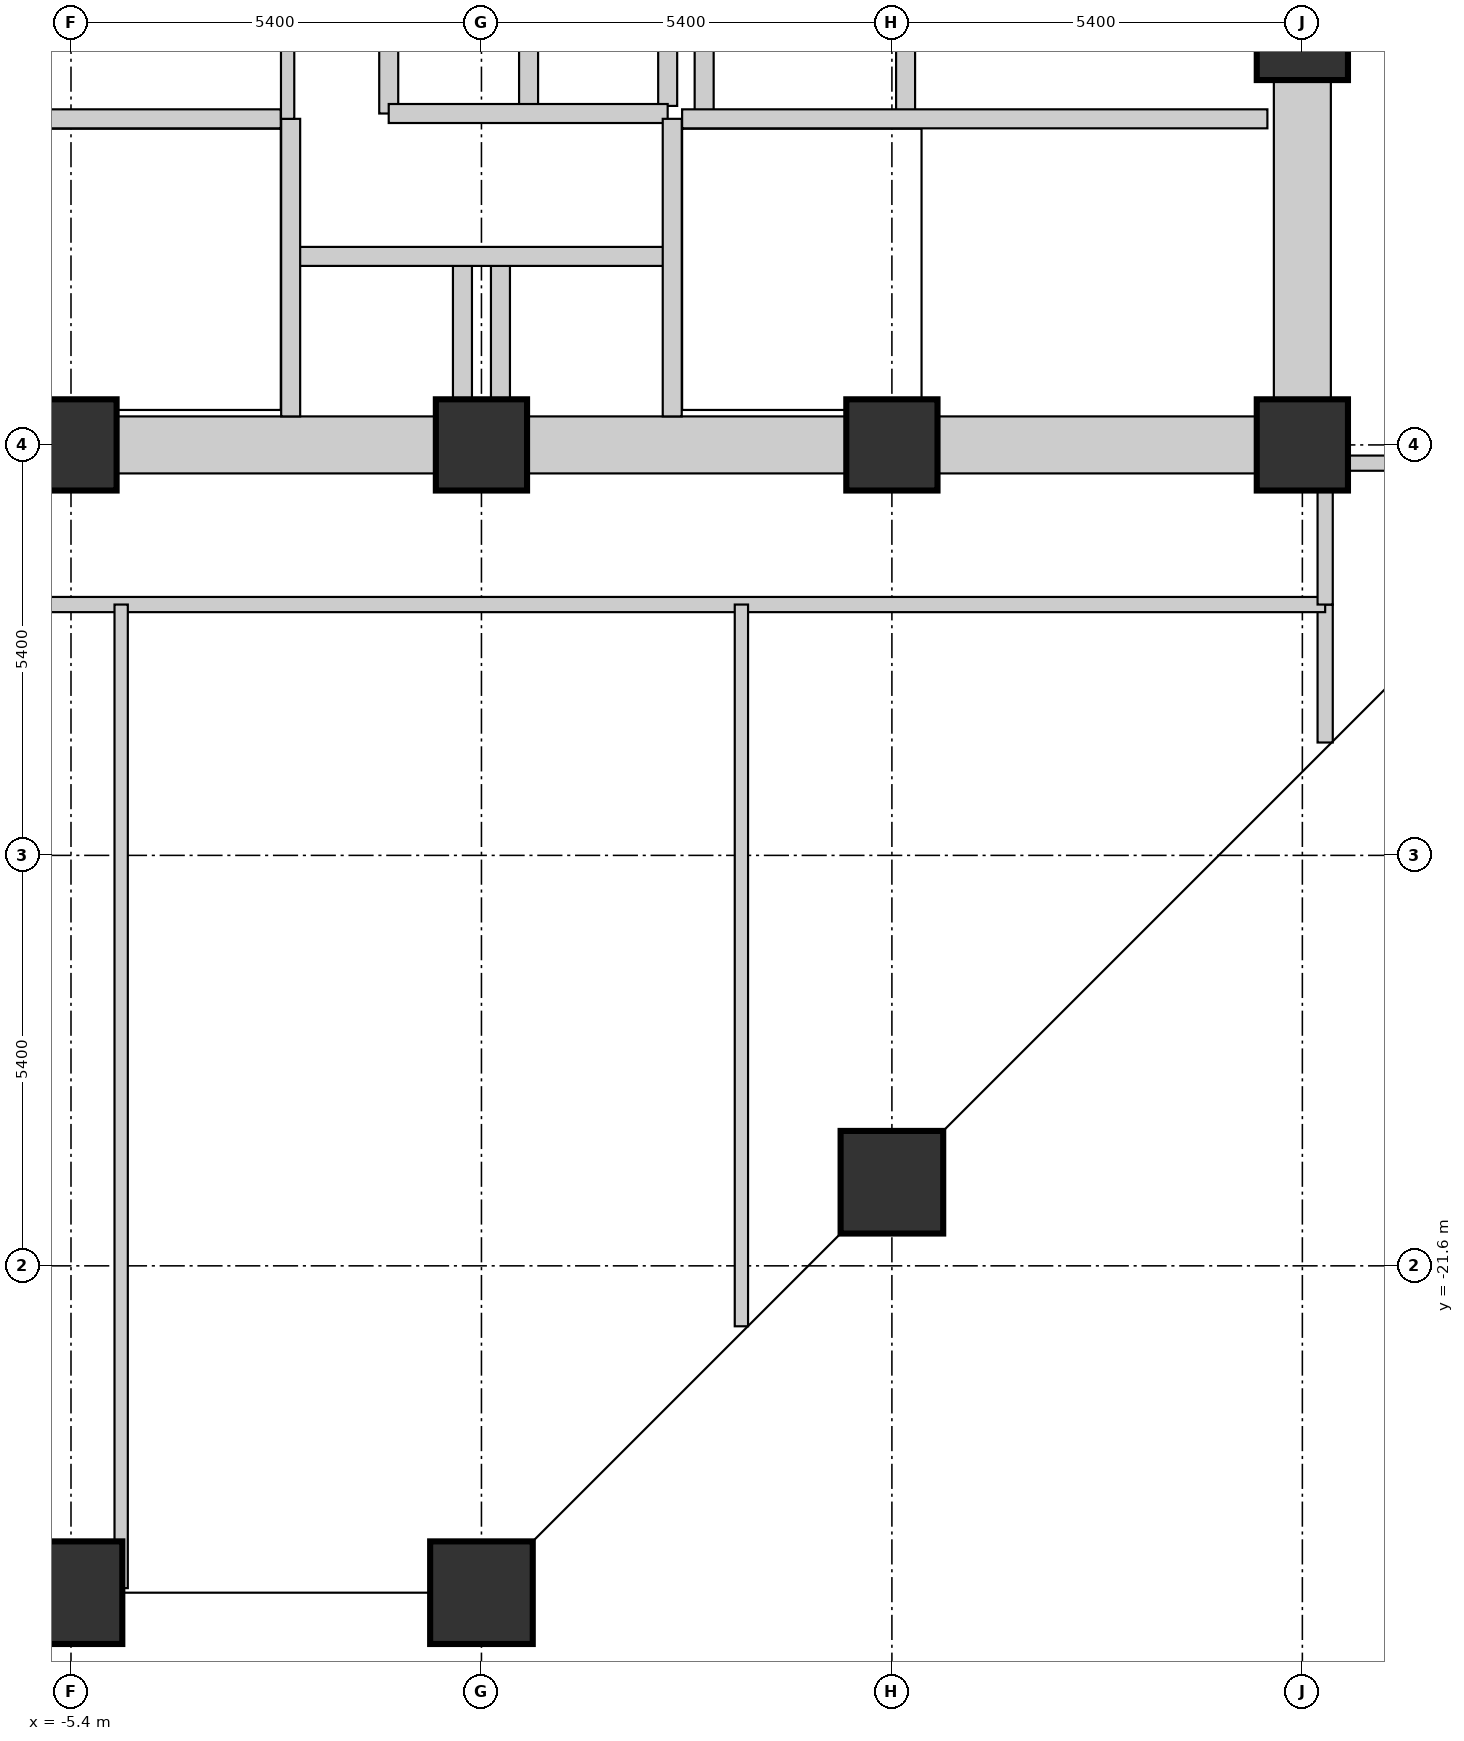
"""IFC4 building model, lengths in metres.
Left out: names, types, materials, properties, quantities, classifications, styles, units other than length and angle.
Written with IfcOpenShell. Run it as: python <this file> out.ifc"""

import sys

from ifc_helpers import new_model, si_unit, direction, frame, frame_2d, origin, origin_2d, place, context, subcontext, project, spatial, rectangle, extrude, element, fill, save


model = new_model("IFC4")
c1 = context("Model", 3, precision=1e-05, world=origin(), true_north=direction((0.0, 1.0)))
c2 = subcontext(c1, "Body", "Model", "MODEL_VIEW")
j1 = project(units=[si_unit("LENGTHUNIT", "METRE"), si_unit("PLANEANGLEUNIT", "RADIAN")], contexts=[c1])
p1 = place(None, origin())
s1 = spatial("IfcSite", under=j1, at=p1, CompositionType="ELEMENT")
p2 = place(p1, origin())
s2 = spatial("IfcBuilding", under=s1, at=p2, CompositionType="ELEMENT")
p3 = place(p2, frame((0.0, 0.0, 22.5)))
s3 = spatial("IfcBuildingStorey", under=s2, at=p3, CompositionType="ELEMENT", Elevation=22.5)
p4 = place(p3, frame((-5.4, -25.9, 0.0), z_axis=(0.0, 0.0, 1.0), x_axis=(1.0, 0.0, 0.0)))
e1 = element("IfcColumn", 1, at=p4, inside=s3, PredefinedType="COLUMN", context=c2, shape_type="SweptSolid", body=[
    extrude(rectangle(XDim=1.35, YDim=1.35, at=origin_2d()), origin(), (0.0, 0.0, 1.0), 3.75),
])
p5 = place(p3, frame((-5.4, -10.8, 0.0), z_axis=(0.0, 0.0, 1.0), x_axis=(1.0, 0.0, 0.0)))
e2 = element("IfcColumn", 2, at=p5, inside=s3, PredefinedType="COLUMN", context=c2, shape_type="SweptSolid", body=[
    extrude(rectangle(XDim=1.2, YDim=1.2, at=origin_2d()), origin(), (0.0, 0.0, 1.0), 3.75),
])
p6 = place(p3, frame((0.0, -25.9, 0.0), z_axis=(0.0, 0.0, 1.0), x_axis=(1.0, 0.0, 0.0)))
e3 = element("IfcColumn", 3, at=p6, inside=s3, PredefinedType="COLUMN", context=c2, shape_type="SweptSolid", body=[
    extrude(rectangle(XDim=1.35, YDim=1.35, at=origin_2d()), origin(), (0.0, 0.0, 1.0), 3.75),
])
p7 = place(p3, frame((0.0, -10.8, 0.0), z_axis=(0.0, 0.0, 1.0), x_axis=(1.0, 0.0, 0.0)))
e4 = element("IfcColumn", 4, at=p7, inside=s3, PredefinedType="COLUMN", context=c2, shape_type="SweptSolid", body=[
    extrude(rectangle(XDim=1.2, YDim=1.2, at=origin_2d()), origin(), (0.0, 0.0, 1.0), 3.75),
])
p8 = place(p3, frame((5.4, -20.5, 0.0), z_axis=(0.0, 0.0, 1.0), x_axis=(1.0, 0.0, 0.0)))
e5 = element("IfcColumn", 5, at=p8, inside=s3, PredefinedType="COLUMN", context=c2, shape_type="SweptSolid", body=[
    extrude(rectangle(XDim=1.35, YDim=1.35, at=origin_2d()), origin(), (0.0, 0.0, 1.0), 3.75),
])
for number, where, z_axis, x_axis in (
    (6, (5.4, -10.8, 0.0), (0.0, 0.0, 1.0), (1.0, 0.0, 0.0)),
    (7, (10.8, -10.8, 0.0), (0.0, 0.0, 1.0), (1.0, 0.0, 0.0)),
    (8, (10.8, -5.4, 0.0), (0.0, 0.0, 1.0), (1.0, 0.0, 0.0)),
):
    element("IfcColumn", number, at=place(p3, frame(where, z_axis=z_axis, x_axis=x_axis)), inside=s3, PredefinedType="COLUMN", context=c2, shape_type="SweptSolid", body=[
        extrude(rectangle(XDim=1.2, YDim=1.2, at=origin_2d()), origin(), (0.0, 0.0, 1.0), 3.75),
    ])
for number, where, z_axis, x_axis in (
    (9, (10.8, -10.19, 0.0), (0.0, 0.0, 1.0), (0.0, 1.0, 0.0)),
    (10, (-4.79, -10.8, 0.0), (0.0, 0.0, 1.0), (1.0, 0.0, 0.0)),
    (11, (0.61, -10.8, 0.0), (0.0, 0.0, 1.0), (1.0, 0.0, 0.0)),
    (12, (6.01, -10.8, 0.0), (0.0, 0.0, 1.0), (1.0, 0.0, 0.0)),
):
    element("IfcWall", number, at=place(p3, frame(where, z_axis=z_axis, x_axis=x_axis)), inside=s3, PredefinedType="SHEAR", context=c2, shape_type="SweptSolid", body=[
        extrude(rectangle(XDim=4.18, YDim=0.75, at=frame_2d((2.09, 0.0))), origin(), (0.0, 0.0, 1.0), 3.75),
    ])
p9 = place(p3, frame((2.93, -6.51, 0.0), z_axis=(0.0, 0.0, 1.0), x_axis=(0.0, 1.0, 0.0)))
e13 = element("IfcWall", 13, at=p9, inside=s3, PredefinedType="SHEAR", context=c2, shape_type="SweptSolid", body=[
    extrude(rectangle(XDim=2.79, YDim=0.25, at=frame_2d((1.395, 0.0))), origin(), (0.0, 0.0, 1.0), 3.75),
])
p10 = place(p3, frame((5.58, -6.51, 0.0), z_axis=(0.0, 0.0, 1.0), x_axis=(0.0, 1.0, 0.0)))
e14 = element("IfcWall", 14, at=p10, inside=s3, PredefinedType="SHEAR", context=c2, shape_type="SweptSolid", body=[
    extrude(rectangle(XDim=5.09, YDim=0.25, at=frame_2d((2.545, 0.0))), origin(), (0.0, 0.0, 1.0), 3.75),
])
p11 = place(p10, frame((0.85, 0.0, 0.0)))
e15 = element("IfcOpeningElement", 15, at=p11, cuts=e14, PredefinedType="OPENING", context=c2, shape_type="SweptSolid", body=[
    extrude(rectangle(XDim=1.1, YDim=2.1, at=frame_2d((0.55, 1.05))), frame((0.0, 0.135, 0.0), z_axis=(0.0, -1.0, 0.0), x_axis=(1.0, 0.0, 0.0)), (0.0, 0.0, 1.0), 0.27),
])
for number, where, z_axis, x_axis in (
    (16, (0.62, -6.34, 0.0), (0.0, 0.0, 1.0), (0.0, 1.0, 0.0)),
    (17, (2.45, -6.34, 0.0), (0.0, 0.0, 1.0), (0.0, 1.0, 0.0)),
):
    element("IfcWall", number, at=place(p3, frame(where, z_axis=z_axis, x_axis=x_axis)), inside=s3, PredefinedType="SHEAR", context=c2, shape_type="SweptSolid", body=[
        extrude(rectangle(XDim=1.88, YDim=0.25, at=frame_2d((0.94, 0.0))), origin(), (0.0, 0.0, 1.0), 3.75),
    ])
for number, where, z_axis, x_axis in (
    (18, (-0.25, -10.2, 0.0), (0.0, 0.0, 1.0), (0.0, 1.0, 0.0)),
    (19, (0.25, -10.2, 0.0), (0.0, 0.0, 1.0), (0.0, 1.0, 0.0)),
):
    element("IfcWall", number, at=place(p3, frame(where, z_axis=z_axis, x_axis=x_axis)), inside=s3, PredefinedType="SHEAR", context=c2, shape_type="SweptSolid", body=[
        extrude(rectangle(XDim=1.76, YDim=0.25, at=frame_2d((0.88, 0.0))), origin(), (0.0, 0.0, 1.0), 3.75),
    ])
p12 = place(p3, frame((-1.22, -6.44, 0.0), z_axis=(0.0, 0.0, 1.0), x_axis=(0.0, 1.0, 0.0)))
e20 = element("IfcWall", 20, at=p12, inside=s3, PredefinedType="SHEAR", context=c2, shape_type="SweptSolid", body=[
    extrude(rectangle(XDim=2.08, YDim=0.25, at=frame_2d((1.04, 0.0))), origin(), (0.0, 0.0, 1.0), 3.75),
])
p13 = place(p3, frame((-1.22, -6.44, 0.0), z_axis=(0.0, 0.0, 1.0), x_axis=(1.0, 0.0, 0.0)))
e21 = element("IfcWall", 21, at=p13, inside=s3, PredefinedType="SHEAR", context=c2, shape_type="SweptSolid", body=[
    extrude(rectangle(XDim=3.67, YDim=0.25, at=frame_2d((1.835, 0.0))), origin(), (0.0, 0.0, 1.0), 3.75),
])
p14 = place(p3, frame((-2.48, -8.32, 0.0), z_axis=(0.0, 0.0, 1.0), x_axis=(1.0, 0.0, 0.0)))
e22 = element("IfcWall", 22, at=p14, inside=s3, PredefinedType="SHEAR", context=c2, shape_type="SweptSolid", body=[
    extrude(rectangle(XDim=4.93, YDim=0.25, at=frame_2d((2.465, 0.0))), origin(), (0.0, 0.0, 1.0), 3.75),
])
p15 = place(p3, frame((2.64, -6.51, 0.0), z_axis=(0.0, 0.0, 1.0), x_axis=(1.0, 0.0, 0.0)))
e23 = element("IfcWall", 23, at=p15, inside=s3, PredefinedType="SHEAR", context=c2, shape_type="SweptSolid", body=[
    extrude(rectangle(XDim=7.7, YDim=0.25, at=frame_2d((3.85, 0.0))), origin(), (0.0, 0.0, 1.0), 3.75),
])
p16 = place(p15, frame((6.0, 0.0, 0.0)))
e24 = element("IfcOpeningElement", 24, at=p16, cuts=e23, PredefinedType="OPENING", context=c2, shape_type="SweptSolid", body=[
    extrude(rectangle(XDim=0.95, YDim=2.1, at=frame_2d((0.475, 1.05))), frame((0.0, 0.135, 0.0), z_axis=(0.0, -1.0, 0.0), x_axis=(1.0, 0.0, 0.0)), (0.0, 0.0, 1.0), 0.27),
])
for number, where, z_axis, x_axis in (
    (25, (2.51, -10.425, 0.0), (0.0, 0.0, 1.0), (0.0, 1.0, 0.0)),
    (26, (-2.51, -10.425, 0.0), (0.0, 0.0, 1.0), (0.0, 1.0, 0.0)),
):
    element("IfcWall", number, at=place(p3, frame(where, z_axis=z_axis, x_axis=x_axis)), inside=s3, PredefinedType="SHEAR", context=c2, shape_type="SweptSolid", body=[
        extrude(rectangle(XDim=3.915, YDim=0.25, at=frame_2d((1.958, 0.0))), origin(), (0.0, 0.0, 1.0), 3.75),
    ])
p17 = place(p3, frame((-10.34, -6.51, 0.0), z_axis=(0.0, 0.0, 1.0), x_axis=(1.0, 0.0, 0.0)))
e27 = element("IfcWall", 27, at=p17, inside=s3, PredefinedType="SHEAR", context=c2, shape_type="SweptSolid", body=[
    extrude(rectangle(XDim=7.7, YDim=0.25, at=frame_2d((3.85, 0.0))), origin(), (0.0, 0.0, 1.0), 3.75),
])
p18 = place(p17, frame((0.35, 0.0, 0.0)))
e28 = element("IfcOpeningElement", 28, at=p18, cuts=e27, PredefinedType="OPENING", context=c2, shape_type="SweptSolid", body=[
    extrude(rectangle(XDim=1.1, YDim=2.1, at=frame_2d((0.55, 1.05))), frame((0.0, 0.135, 0.0), z_axis=(0.0, -1.0, 0.0), x_axis=(1.0, 0.0, 0.0)), (0.0, 0.0, 1.0), 0.27),
])
p19 = place(p3, frame((-2.55, -6.51, 0.0), z_axis=(0.0, 0.0, 1.0), x_axis=(0.0, 1.0, 0.0)))
e29 = element("IfcWall", 29, at=p19, inside=s3, PredefinedType="PARTITIONING", context=c2, shape_type="SweptSolid", body=[
    extrude(rectangle(XDim=5.16, YDim=0.175, at=frame_2d((2.58, 0.0))), origin(), (0.0, 0.0, 1.0), 3.57),
])
p20 = place(p19, frame((3.3, 0.0, 0.0)))
e30 = element("IfcOpeningElement", 30, at=p20, cuts=e29, PredefinedType="OPENING", context=c2, shape_type="SweptSolid", body=[
    extrude(rectangle(XDim=0.85, YDim=2.1, at=frame_2d((0.425, 1.05))), frame((0.0, 0.097, 0.0), z_axis=(0.0, -1.0, 0.0), x_axis=(1.0, 0.0, 0.0)), (0.0, 0.0, 1.0), 0.195),
])
p21 = place(p3, frame((11.1, -14.715, 0.0), z_axis=(0.0, 0.0, 1.0), x_axis=(0.0, 1.0, 0.0)))
e31 = element("IfcWall", 31, at=p21, inside=s3, PredefinedType="PARTITIONING", context=c2, shape_type="SweptSolid", body=[
    extrude(rectangle(XDim=1.815, YDim=0.2, at=frame_2d((0.908, 0.0))), origin(), (0.0, 0.0, 1.0), 3.57),
])
p22 = place(p3, frame((10.85, -11.04, 0.0), z_axis=(0.0, 0.0, 1.0), x_axis=(1.0, 0.0, 0.0)))
e32 = element("IfcWall", 32, at=p22, inside=s3, PredefinedType="PARTITIONING", context=c2, shape_type="SweptSolid", body=[
    extrude(rectangle(XDim=2.05, YDim=0.2, at=frame_2d((1.025, 0.0))), origin(), (0.0, 0.0, 1.0), 3.57),
])
p23 = place(p3, frame((-12.9, -12.9, 0.0), z_axis=(0.0, 0.0, 1.0), x_axis=(1.0, 0.0, 0.0)))
e33 = element("IfcWall", 33, at=p23, inside=s3, PredefinedType="PARTITIONING", context=c2, shape_type="SweptSolid", body=[
    extrude(rectangle(XDim=24.0, YDim=0.2, at=frame_2d((12.0, 0.0))), origin(), (0.0, 0.0, 1.0), 2.93),
])
p24 = place(p23, frame((3.63, 0.0, 0.0)))
e34 = element("IfcOpeningElement", 34, at=p24, cuts=e33, PredefinedType="OPENING", context=c2, shape_type="SweptSolid", body=[
    extrude(rectangle(XDim=0.85, YDim=2.1, at=frame_2d((0.425, 1.05))), frame((0.0, 0.11, 0.0), z_axis=(0.0, -1.0, 0.0), x_axis=(1.0, 0.0, 0.0)), (0.0, 0.0, 1.0), 0.22),
])
p25 = place(p23, frame((15.19, 0.0, 0.0)))
e35 = element("IfcOpeningElement", 35, at=p25, cuts=e33, PredefinedType="OPENING", context=c2, shape_type="SweptSolid", body=[
    extrude(rectangle(XDim=0.85, YDim=2.1, at=frame_2d((0.425, 1.05))), frame((0.0, 0.11, 0.0), z_axis=(0.0, -1.0, 0.0), x_axis=(1.0, 0.0, 0.0)), (0.0, 0.0, 1.0), 0.22),
])
p26 = place(p23, frame((19.71, 0.0, 0.0)))
e36 = element("IfcOpeningElement", 36, at=p26, cuts=e33, PredefinedType="OPENING", context=c2, shape_type="SweptSolid", body=[
    extrude(rectangle(XDim=0.85, YDim=2.1, at=frame_2d((0.425, 1.05))), frame((0.0, 0.11, 0.0), z_axis=(0.0, -1.0, 0.0), x_axis=(1.0, 0.0, 0.0)), (0.0, 0.0, 1.0), 0.22),
])
p27 = place(p3, frame((11.1, -12.9, 0.0), z_axis=(0.0, 0.0, 1.0), x_axis=(0.0, 1.0, 0.0)))
e37 = element("IfcWall", 37, at=p27, inside=s3, PredefinedType="PARTITIONING", context=c2, shape_type="SweptSolid", body=[
    extrude(rectangle(XDim=1.86, YDim=0.2, at=frame_2d((0.93, 0.0))), origin(), (0.0, 0.0, 1.0), 3.57),
])
p28 = place(p3, frame((-4.74, -25.84, 0.0), z_axis=(0.0, 0.0, 1.0), x_axis=(0.0, 1.0, 0.0)))
e38 = element("IfcWall", 38, at=p28, inside=s3, PredefinedType="PARTITIONING", context=c2, shape_type="SweptSolid", body=[
    extrude(rectangle(XDim=12.94, YDim=0.175, at=frame_2d((6.47, 0.0))), origin(), (0.0, 0.0, 1.0), 2.629),
])
p29 = place(p3, frame((3.42, -22.395, 0.0), z_axis=(0.0, 0.0, 1.0), x_axis=(0.0, 1.0, 0.0)))
e39 = element("IfcWall", 39, at=p29, inside=s3, PredefinedType="PARTITIONING", context=c2, shape_type="SweptSolid", body=[
    extrude(rectangle(XDim=9.495, YDim=0.175, at=frame_2d((4.748, 0.0))), origin(), (0.0, 0.0, 1.0), 2.629),
])
p30 = place(p16, origin())
e40 = element("IfcDoor", 40, at=p30, inside=s3, OperationType="SINGLE_SWING_RIGHT", PredefinedType="DOOR", context=c2, shape_type="SweptSolid", body=[
    extrude(rectangle(XDim=0.95, YDim=2.1, at=frame_2d((0.475, 1.05))), frame((0.0, 0.025, 0.0), z_axis=(0.0, -1.0, 0.0), x_axis=(1.0, 0.0, 0.0)), (0.0, 0.0, 1.0), 0.05),
])
fill(e24, e40)
p31 = place(p11, origin())
e41 = element("IfcDoor", 41, at=p31, inside=s3, OperationType="SLIDING_TO_RIGHT", PredefinedType="DOOR", context=c2, shape_type="SweptSolid", body=[
    extrude(rectangle(XDim=1.1, YDim=2.1, at=frame_2d((0.55, 1.05))), frame((0.0, 0.025, 0.0), z_axis=(0.0, -1.0, 0.0), x_axis=(1.0, 0.0, 0.0)), (0.0, 0.0, 1.0), 0.05),
])
fill(e15, e41)
p32 = place(p25, origin())
e42 = element("IfcDoor", 42, at=p32, inside=s3, OperationType="SINGLE_SWING_RIGHT", PredefinedType="DOOR", context=c2, shape_type="SweptSolid", body=[
    extrude(rectangle(XDim=0.85, YDim=2.1, at=frame_2d((0.425, 1.05))), frame((0.0, 0.025, 0.0), z_axis=(0.0, -1.0, 0.0), x_axis=(1.0, 0.0, 0.0)), (0.0, 0.0, 1.0), 0.05),
])
fill(e35, e42)
p33 = place(p26, origin())
e43 = element("IfcDoor", 43, at=p33, inside=s3, OperationType="SINGLE_SWING_LEFT", PredefinedType="DOOR", context=c2, shape_type="SweptSolid", body=[
    extrude(rectangle(XDim=0.85, YDim=2.1, at=frame_2d((0.425, 1.05))), frame((0.0, 0.025, 0.0), z_axis=(0.0, -1.0, 0.0), x_axis=(1.0, 0.0, 0.0)), (0.0, 0.0, 1.0), 0.05),
])
fill(e36, e43)
save(model, sys.argv[1])
